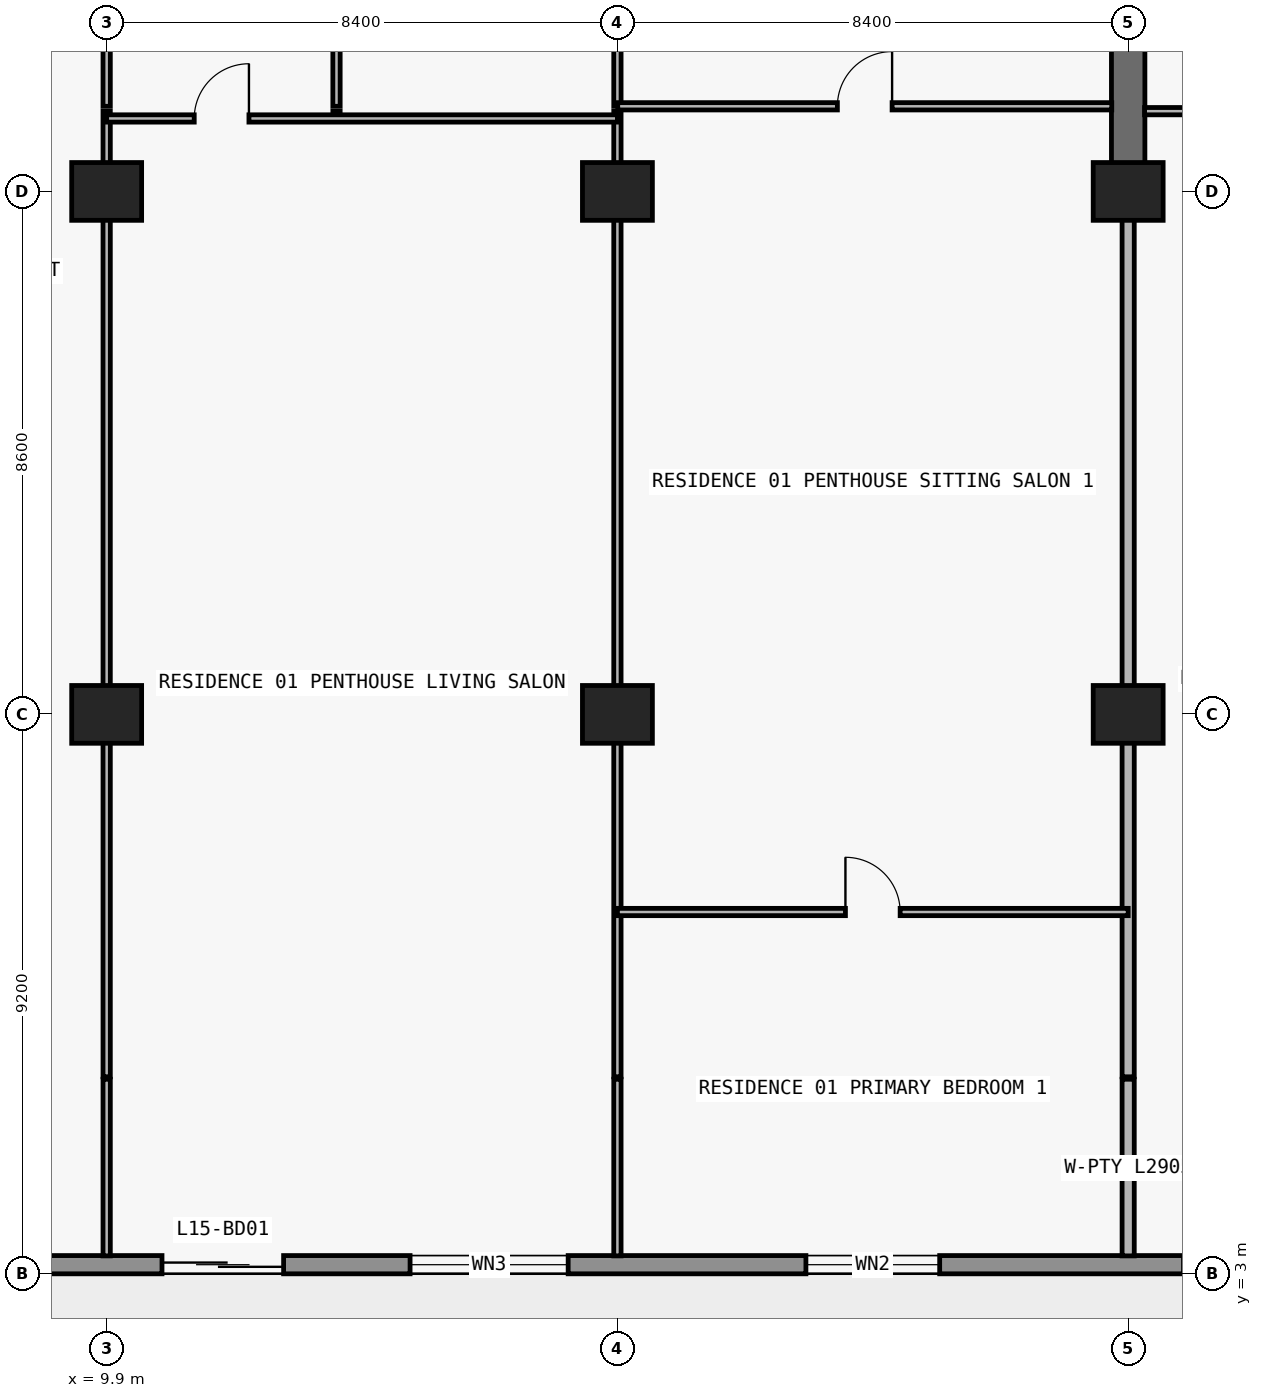
"""IFC4 building model, lengths in metres.
Left out: names, types, materials, properties, quantities, classifications, styles, units other than length and angle.
Written with IfcOpenShell. Run it as: python <this file> out.ifc"""

import sys

from ifc_helpers import new_model, si_unit, direction, frame, frame_2d, origin, origin_2d, place, context, subcontext, project, spatial, rectangle, extrude, element, fill, save


model = new_model("IFC4")
c1 = context("Model", 3, precision=1e-05, world=origin(), true_north=direction((0.0, 1.0)))
c2 = subcontext(c1, "Body", "Model", "MODEL_VIEW")
j1 = project(units=[si_unit("LENGTHUNIT", "METRE"), si_unit("PLANEANGLEUNIT", "RADIAN")], contexts=[c1])
p1 = place(None, origin())
s1 = spatial("IfcSite", under=j1, at=p1, CompositionType="ELEMENT")
p2 = place(p1, origin())
s2 = spatial("IfcBuilding", under=s1, at=p2, CompositionType="ELEMENT")
p3 = place(p2, frame((0.0, 0.0, 59.7)))
s3 = spatial("IfcBuildingStorey", under=s2, at=p3, CompositionType="ELEMENT", Elevation=59.7)
for number, where, z_axis, x_axis in (
    (1, (9.9, 12.2, 0.0), (0.0, 0.0, 1.0), (1.0, 0.0, 0.0)),
    (2, (18.3, 12.2, 0.0), (0.0, 0.0, 1.0), (1.0, 0.0, 0.0)),
    (3, (26.7, 12.2, 0.0), (0.0, 0.0, 1.0), (1.0, 0.0, 0.0)),
    (4, (9.9, 20.8, 0.0), (0.0, 0.0, 1.0), (1.0, 0.0, 0.0)),
    (5, (18.3, 20.8, 0.0), (0.0, 0.0, 1.0), (1.0, 0.0, 0.0)),
    (6, (26.7, 20.8, 0.0), (0.0, 0.0, 1.0), (1.0, 0.0, 0.0)),
):
    element("IfcColumn", number, at=place(p3, frame(where, z_axis=z_axis, x_axis=x_axis)), inside=s3, PredefinedType="COLUMN", context=c2, shape_type="SweptSolid", body=[
        extrude(rectangle(XDim=1.15, YDim=0.95, at=origin_2d()), origin(), (0.0, 0.0, 1.0), 3.05),
    ])
p4 = place(p3, frame((26.7, 20.8, 0.0), z_axis=(0.0, 0.0, 1.0), x_axis=(0.0, 1.0, 0.0)))
e7 = element("IfcWall", 7, at=p4, inside=s3, PredefinedType="SHEAR", context=c2, shape_type="SweptSolid", body=[
    extrude(rectangle(XDim=8.6, YDim=0.55, at=frame_2d((4.3, 0.0))), origin(), (0.0, 0.0, 1.0), 3.05),
])
p5 = place(p3, frame((72.7, 3.15, 0.0), z_axis=(0.0, 0.0, 1.0), x_axis=(-1.0, 0.0, 0.0)))
e8 = element("IfcWall", 8, at=p5, inside=s3, PredefinedType="STANDARD", context=c2, shape_type="SweptSolid", body=[
    extrude(rectangle(XDim=67.6, YDim=0.3, at=frame_2d((33.8, 0.0))), origin(), (0.0, 0.0, 1.0), 3.05),
])
p6 = place(p5, frame((59.89, 0.0, 0.0)))
e9 = element("IfcOpeningElement", 9, at=p6, cuts=e8, PredefinedType="OPENING", context=c2, shape_type="SweptSolid", body=[
    extrude(rectangle(XDim=2.0, YDim=2.3, at=frame_2d((1.0, 1.15))), frame((0.0, 0.16, 0.0), z_axis=(0.0, -1.0, 0.0), x_axis=(1.0, 0.0, 0.0)), (0.0, 0.0, 1.0), 0.32),
])
p7 = place(p5, frame((55.21, 0.0, 0.65)))
e10 = element("IfcOpeningElement", 10, at=p7, cuts=e8, PredefinedType="OPENING", context=c2, shape_type="SweptSolid", body=[
    extrude(rectangle(XDim=2.6, YDim=1.85, at=frame_2d((1.3, 0.925))), frame((0.0, 0.16, 0.0), z_axis=(0.0, -1.0, 0.0), x_axis=(1.0, 0.0, 0.0)), (0.0, 0.0, 1.0), 0.32),
])
p8 = place(p5, frame((49.1, 0.0, 0.85)))
e11 = element("IfcOpeningElement", 11, at=p8, cuts=e8, PredefinedType="OPENING", context=c2, shape_type="SweptSolid", body=[
    extrude(rectangle(XDim=2.2, YDim=1.55, at=frame_2d((1.1, 0.775))), frame((0.0, 0.16, 0.0), z_axis=(0.0, -1.0, 0.0), x_axis=(1.0, 0.0, 0.0)), (0.0, 0.0, 1.0), 0.32),
])
p9 = place(p5, frame((43.09, 0.0, 0.0)))
e12 = element("IfcOpeningElement", 12, at=p9, cuts=e8, PredefinedType="OPENING", context=c2, shape_type="SweptSolid", body=[
    extrude(rectangle(XDim=2.0, YDim=2.3, at=frame_2d((1.0, 1.15))), frame((0.0, 0.16, 0.0), z_axis=(0.0, -1.0, 0.0), x_axis=(1.0, 0.0, 0.0)), (0.0, 0.0, 1.0), 0.32),
])
p10 = place(p5, frame((38.41, 0.0, 0.65)))
e13 = element("IfcOpeningElement", 13, at=p10, cuts=e8, PredefinedType="OPENING", context=c2, shape_type="SweptSolid", body=[
    extrude(rectangle(XDim=2.6, YDim=1.85, at=frame_2d((1.3, 0.925))), frame((0.0, 0.16, 0.0), z_axis=(0.0, -1.0, 0.0), x_axis=(1.0, 0.0, 0.0)), (0.0, 0.0, 1.0), 0.32),
])
p11 = place(p5, frame((32.7, 0.0, 0.85)))
e14 = element("IfcOpeningElement", 14, at=p11, cuts=e8, PredefinedType="OPENING", context=c2, shape_type="SweptSolid", body=[
    extrude(rectangle(XDim=2.2, YDim=1.55, at=frame_2d((1.1, 0.775))), frame((0.0, 0.16, 0.0), z_axis=(0.0, -1.0, 0.0), x_axis=(1.0, 0.0, 0.0)), (0.0, 0.0, 1.0), 0.32),
])
p12 = place(p5, frame((27.026, 0.0, 0.0)))
e15 = element("IfcOpeningElement", 15, at=p12, cuts=e8, PredefinedType="OPENING", context=c2, shape_type="SweptSolid", body=[
    extrude(rectangle(XDim=2.0, YDim=2.3, at=frame_2d((1.0, 1.15))), frame((0.0, 0.16, 0.0), z_axis=(0.0, -1.0, 0.0), x_axis=(1.0, 0.0, 0.0)), (0.0, 0.0, 1.0), 0.32),
])
p13 = place(p5, frame((22.726, 0.0, 0.85)))
e16 = element("IfcOpeningElement", 16, at=p13, cuts=e8, PredefinedType="OPENING", context=c2, shape_type="SweptSolid", body=[
    extrude(rectangle(XDim=2.2, YDim=1.55, at=frame_2d((1.1, 0.775))), frame((0.0, 0.16, 0.0), z_axis=(0.0, -1.0, 0.0), x_axis=(1.0, 0.0, 0.0)), (0.0, 0.0, 1.0), 0.32),
])
p14 = place(p5, frame((18.29, 0.0, 0.0)))
e17 = element("IfcOpeningElement", 17, at=p14, cuts=e8, PredefinedType="OPENING", context=c2, shape_type="SweptSolid", body=[
    extrude(rectangle(XDim=2.0, YDim=2.3, at=frame_2d((1.0, 1.15))), frame((0.0, 0.16, 0.0), z_axis=(0.0, -1.0, 0.0), x_axis=(1.0, 0.0, 0.0)), (0.0, 0.0, 1.0), 0.32),
])
p15 = place(p5, frame((14.19, 0.0, 0.85)))
e18 = element("IfcOpeningElement", 18, at=p15, cuts=e8, PredefinedType="OPENING", context=c2, shape_type="SweptSolid", body=[
    extrude(rectangle(XDim=1.8, YDim=1.55, at=frame_2d((0.9, 0.775))), frame((0.0, 0.16, 0.0), z_axis=(0.0, -1.0, 0.0), x_axis=(1.0, 0.0, 0.0)), (0.0, 0.0, 1.0), 0.32),
])
p16 = place(p5, frame((10.226, 0.0, 0.0)))
e19 = element("IfcOpeningElement", 19, at=p16, cuts=e8, PredefinedType="OPENING", context=c2, shape_type="SweptSolid", body=[
    extrude(rectangle(XDim=2.0, YDim=2.3, at=frame_2d((1.0, 1.15))), frame((0.0, 0.16, 0.0), z_axis=(0.0, -1.0, 0.0), x_axis=(1.0, 0.0, 0.0)), (0.0, 0.0, 1.0), 0.32),
])
p17 = place(p5, frame((5.926, 0.0, 0.85)))
e20 = element("IfcOpeningElement", 20, at=p17, cuts=e8, PredefinedType="OPENING", context=c2, shape_type="SweptSolid", body=[
    extrude(rectangle(XDim=2.2, YDim=1.55, at=frame_2d((1.1, 0.775))), frame((0.0, 0.16, 0.0), z_axis=(0.0, -1.0, 0.0), x_axis=(1.0, 0.0, 0.0)), (0.0, 0.0, 1.0), 0.32),
])
p18 = place(p3, frame((9.9, 3.295, 0.0), z_axis=(0.0, 0.0, 1.0), x_axis=(0.0, 1.0, 0.0)))
e21 = element("IfcWall", 21, at=p18, inside=s3, PredefinedType="PARTITIONING", context=c2, shape_type="SweptSolid", body=[
    extrude(rectangle(XDim=2.905, YDim=0.12, at=frame_2d((1.453, 0.0))), origin(), (0.0, 0.0, 1.0), 3.05),
])
p19 = place(p3, frame((9.9, 6.24, 0.0), z_axis=(0.0, 0.0, 1.0), x_axis=(0.0, 1.0, 0.0)))
e22 = element("IfcWall", 22, at=p19, inside=s3, PredefinedType="PARTITIONING", context=c2, shape_type="SweptSolid", body=[
    extrude(rectangle(XDim=15.88, YDim=0.12, at=frame_2d((7.94, 0.0))), origin(), (0.0, 0.0, 1.0), 2.11),
])
p20 = place(p3, frame((9.9, 22.2, 0.0), z_axis=(0.0, 0.0, 1.0), x_axis=(0.0, 1.0, 0.0)))
e23 = element("IfcWall", 23, at=p20, inside=s3, PredefinedType="PARTITIONING", context=c2, shape_type="SweptSolid", body=[
    extrude(rectangle(XDim=4.38, YDim=0.12, at=frame_2d((2.19, 0.0))), origin(), (0.0, 0.0, 1.0), 2.11),
])
p21 = place(p20, frame((1.74, 0.0, 0.0)))
e24 = element("IfcOpeningElement", 24, at=p21, cuts=e23, PredefinedType="OPENING", context=c2, shape_type="SweptSolid", body=[
    extrude(rectangle(XDim=0.9, YDim=2.06, at=frame_2d((0.45, 1.03))), frame((0.0, 0.07, 0.0), z_axis=(0.0, -1.0, 0.0), x_axis=(1.0, 0.0, 0.0)), (0.0, 0.0, 1.0), 0.14),
])
p22 = place(p3, frame((13.68, 22.0, 0.0), z_axis=(0.0, 0.0, 1.0), x_axis=(0.0, 1.0, 0.0)))
e25 = element("IfcWall", 25, at=p22, inside=s3, PredefinedType="PARTITIONING", context=c2, shape_type="SweptSolid", body=[
    extrude(rectangle(XDim=0.12, YDim=0.12, at=frame_2d((0.06, 0.0))), origin(), (0.0, 0.0, 1.0), 3.05),
])
p23 = place(p3, frame((13.68, 22.2, 0.0), z_axis=(0.0, 0.0, 1.0), x_axis=(0.0, 1.0, 0.0)))
e26 = element("IfcWall", 26, at=p23, inside=s3, PredefinedType="PARTITIONING", context=c2, shape_type="SweptSolid", body=[
    extrude(rectangle(XDim=4.38, YDim=0.12, at=frame_2d((2.19, 0.0))), origin(), (0.0, 0.0, 1.0), 3.05),
])
p24 = place(p23, frame((1.74, 0.0, 0.0)))
e27 = element("IfcOpeningElement", 27, at=p24, cuts=e26, PredefinedType="OPENING", context=c2, shape_type="SweptSolid", body=[
    extrude(rectangle(XDim=0.9, YDim=2.15, at=frame_2d((0.45, 1.075))), frame((0.0, 0.07, 0.0), z_axis=(0.0, -1.0, 0.0), x_axis=(1.0, 0.0, 0.0)), (0.0, 0.0, 1.0), 0.14),
])
p25 = place(p3, frame((18.3, 3.295, 0.0), z_axis=(0.0, 0.0, 1.0), x_axis=(0.0, 1.0, 0.0)))
e28 = element("IfcWall", 28, at=p25, inside=s3, PredefinedType="PARTITIONING", context=c2, shape_type="SweptSolid", body=[
    extrude(rectangle(XDim=2.905, YDim=0.12, at=frame_2d((1.453, 0.0))), origin(), (0.0, 0.0, 1.0), 3.05),
])
p26 = place(p3, frame((18.3, 6.24, 0.0), z_axis=(0.0, 0.0, 1.0), x_axis=(0.0, 1.0, 0.0)))
e29 = element("IfcWall", 29, at=p26, inside=s3, PredefinedType="PARTITIONING", context=c2, shape_type="SweptSolid", body=[
    extrude(rectangle(XDim=15.88, YDim=0.12, at=frame_2d((7.94, 0.0))), origin(), (0.0, 0.0, 1.0), 2.11),
])
p27 = place(p3, frame((18.3, 22.2, 0.0), z_axis=(0.0, 0.0, 1.0), x_axis=(0.0, 1.0, 0.0)))
e30 = element("IfcWall", 30, at=p27, inside=s3, PredefinedType="PARTITIONING", context=c2, shape_type="SweptSolid", body=[
    extrude(rectangle(XDim=4.38, YDim=0.12, at=frame_2d((2.19, 0.0))), origin(), (0.0, 0.0, 1.0), 2.11),
])
p28 = place(p27, frame((1.74, 0.0, 0.0)))
e31 = element("IfcOpeningElement", 31, at=p28, cuts=e30, PredefinedType="OPENING", context=c2, shape_type="SweptSolid", body=[
    extrude(rectangle(XDim=0.9, YDim=2.06, at=frame_2d((0.45, 1.03))), frame((0.0, 0.07, 0.0), z_axis=(0.0, -1.0, 0.0), x_axis=(1.0, 0.0, 0.0)), (0.0, 0.0, 1.0), 0.14),
])
p29 = place(p3, frame((26.7, 3.295, 0.0), z_axis=(0.0, 0.0, 1.0), x_axis=(0.0, 1.0, 0.0)))
e32 = element("IfcWall", 32, at=p29, inside=s3, PredefinedType="PARTITIONING", context=c2, shape_type="SweptSolid", body=[
    extrude(rectangle(XDim=2.905, YDim=0.2, at=frame_2d((1.453, 0.0))), origin(), (0.0, 0.0, 1.0), 3.05),
])
p30 = place(p3, frame((26.7, 6.24, 0.0), z_axis=(0.0, 0.0, 1.0), x_axis=(0.0, 1.0, 0.0)))
e33 = element("IfcWall", 33, at=p30, inside=s3, PredefinedType="PARTITIONING", context=c2, shape_type="SweptSolid", body=[
    extrude(rectangle(XDim=14.555, YDim=0.2, at=frame_2d((7.277, 0.0))), origin(), (0.0, 0.0, 1.0), 2.11),
])
p31 = place(p3, frame((18.3, 8.95, 0.0), z_axis=(0.0, 0.0, 1.0), x_axis=(1.0, 0.0, 0.0)))
e34 = element("IfcWall", 34, at=p31, inside=s3, PredefinedType="PARTITIONING", context=c2, shape_type="SweptSolid", body=[
    extrude(rectangle(XDim=8.4, YDim=0.12, at=frame_2d((4.2, 0.0))), origin(), (0.0, 0.0, 1.0), 3.05),
])
p32 = place(p31, frame((3.75, 0.0, 0.0)))
e35 = element("IfcOpeningElement", 35, at=p32, cuts=e34, PredefinedType="OPENING", context=c2, shape_type="SweptSolid", body=[
    extrude(rectangle(XDim=0.9, YDim=2.15, at=frame_2d((0.45, 1.075))), frame((0.0, 0.07, 0.0), z_axis=(0.0, -1.0, 0.0), x_axis=(1.0, 0.0, 0.0)), (0.0, 0.0, 1.0), 0.14),
])
p33 = place(p3, frame((9.9, 22.0, 0.0), z_axis=(0.0, 0.0, 1.0), x_axis=(1.0, 0.0, 0.0)))
e36 = element("IfcWall", 36, at=p33, inside=s3, PredefinedType="PARTITIONING", context=c2, shape_type="SweptSolid", body=[
    extrude(rectangle(XDim=8.4, YDim=0.12, at=frame_2d((4.2, 0.0))), origin(), (0.0, 0.0, 1.0), 3.05),
])
p34 = place(p33, frame((1.44, 0.0, 0.0)))
e37 = element("IfcOpeningElement", 37, at=p34, cuts=e36, PredefinedType="OPENING", context=c2, shape_type="SweptSolid", body=[
    extrude(rectangle(XDim=0.9, YDim=2.15, at=frame_2d((0.45, 1.075))), frame((0.0, 0.07, 0.0), z_axis=(0.0, -1.0, 0.0), x_axis=(1.0, 0.0, 0.0)), (0.0, 0.0, 1.0), 0.14),
])
p35 = place(p3, frame((26.97, 22.12, 0.0), z_axis=(0.0, 0.0, 1.0), x_axis=(1.0, 0.0, 0.0)))
e38 = element("IfcWall", 38, at=p35, inside=s3, PredefinedType="PARTITIONING", context=c2, shape_type="SweptSolid", body=[
    extrude(rectangle(XDim=8.13, YDim=0.12, at=frame_2d((4.065, 0.0))), origin(), (0.0, 0.0, 1.0), 3.05),
])
p36 = place(p35, frame((1.179, 0.0, 0.0)))
e39 = element("IfcOpeningElement", 39, at=p36, cuts=e38, PredefinedType="OPENING", context=c2, shape_type="SweptSolid", body=[
    extrude(rectangle(XDim=0.9, YDim=2.15, at=frame_2d((0.45, 1.075))), frame((0.0, 0.07, 0.0), z_axis=(0.0, -1.0, 0.0), x_axis=(1.0, 0.0, 0.0)), (0.0, 0.0, 1.0), 0.14),
])
p37 = place(p3, frame((18.305, 22.2, 0.0), z_axis=(0.0, 0.0, 1.0), x_axis=(1.0, 0.0, 0.0)))
e40 = element("IfcWall", 40, at=p37, inside=s3, PredefinedType="PARTITIONING", context=c2, shape_type="SweptSolid", body=[
    extrude(rectangle(XDim=8.125, YDim=0.12, at=frame_2d((4.062, 0.0))), origin(), (0.0, 0.0, 1.0), 3.05),
])
p38 = place(p37, frame((3.613, 0.0, 0.0)))
e41 = element("IfcOpeningElement", 41, at=p38, cuts=e40, PredefinedType="OPENING", context=c2, shape_type="SweptSolid", body=[
    extrude(rectangle(XDim=0.9, YDim=2.15, at=frame_2d((0.45, 1.075))), frame((0.0, 0.07, 0.0), z_axis=(0.0, -1.0, 0.0), x_axis=(1.0, 0.0, 0.0)), (0.0, 0.0, 1.0), 0.14),
])
p39 = place(p6, origin())
e42 = element("IfcDoor", 42, at=p39, inside=s3, OperationType="DOUBLE_DOOR_SLIDING", PredefinedType="DOOR", context=c2, shape_type="SweptSolid", body=[
    extrude(rectangle(XDim=2.0, YDim=2.3, at=frame_2d((1.0, 1.15))), frame((0.0, 0.025, 0.0), z_axis=(0.0, -1.0, 0.0), x_axis=(1.0, 0.0, 0.0)), (0.0, 0.0, 1.0), 0.05),
])
fill(e9, e42)
p40 = place(p7, origin())
e43 = element("IfcWindow", 43, at=p40, inside=s3, PartitioningType="SINGLE_PANEL", PredefinedType="WINDOW", context=c2, shape_type="SweptSolid", body=[
    extrude(rectangle(XDim=2.6, YDim=1.85, at=frame_2d((1.3, 0.925))), frame((0.0, 0.03, 0.0), z_axis=(0.0, -1.0, 0.0), x_axis=(1.0, 0.0, 0.0)), (0.0, 0.0, 1.0), 0.06),
])
fill(e10, e43)
p41 = place(p8, origin())
e44 = element("IfcWindow", 44, at=p41, inside=s3, PartitioningType="SINGLE_PANEL", PredefinedType="WINDOW", context=c2, shape_type="SweptSolid", body=[
    extrude(rectangle(XDim=2.2, YDim=1.55, at=frame_2d((1.1, 0.775))), frame((0.0, 0.03, 0.0), z_axis=(0.0, -1.0, 0.0), x_axis=(1.0, 0.0, 0.0)), (0.0, 0.0, 1.0), 0.06),
])
fill(e11, e44)
p42 = place(p34, origin())
e45 = element("IfcDoor", 45, at=p42, inside=s3, OperationType="SINGLE_SWING_RIGHT", PredefinedType="DOOR", context=c2, shape_type="SweptSolid", body=[
    extrude(rectangle(XDim=0.9, YDim=2.15, at=frame_2d((0.45, 1.075))), frame((0.0, 0.025, 0.0), z_axis=(0.0, -1.0, 0.0), x_axis=(1.0, 0.0, 0.0)), (0.0, 0.0, 1.0), 0.05),
])
fill(e37, e45)
p43 = place(p38, origin())
e46 = element("IfcDoor", 46, at=p43, inside=s3, OperationType="SINGLE_SWING_RIGHT", PredefinedType="DOOR", context=c2, shape_type="SweptSolid", body=[
    extrude(rectangle(XDim=0.9, YDim=2.15, at=frame_2d((0.45, 1.075))), frame((0.0, 0.025, 0.0), z_axis=(0.0, -1.0, 0.0), x_axis=(1.0, 0.0, 0.0)), (0.0, 0.0, 1.0), 0.05),
])
fill(e41, e46)
p44 = place(p32, origin())
e47 = element("IfcDoor", 47, at=p44, inside=s3, OperationType="SINGLE_SWING_LEFT", PredefinedType="DOOR", context=c2, shape_type="SweptSolid", body=[
    extrude(rectangle(XDim=0.9, YDim=2.15, at=frame_2d((0.45, 1.075))), frame((0.0, 0.025, 0.0), z_axis=(0.0, -1.0, 0.0), x_axis=(1.0, 0.0, 0.0)), (0.0, 0.0, 1.0), 0.05),
])
fill(e35, e47)
save(model, sys.argv[1])
